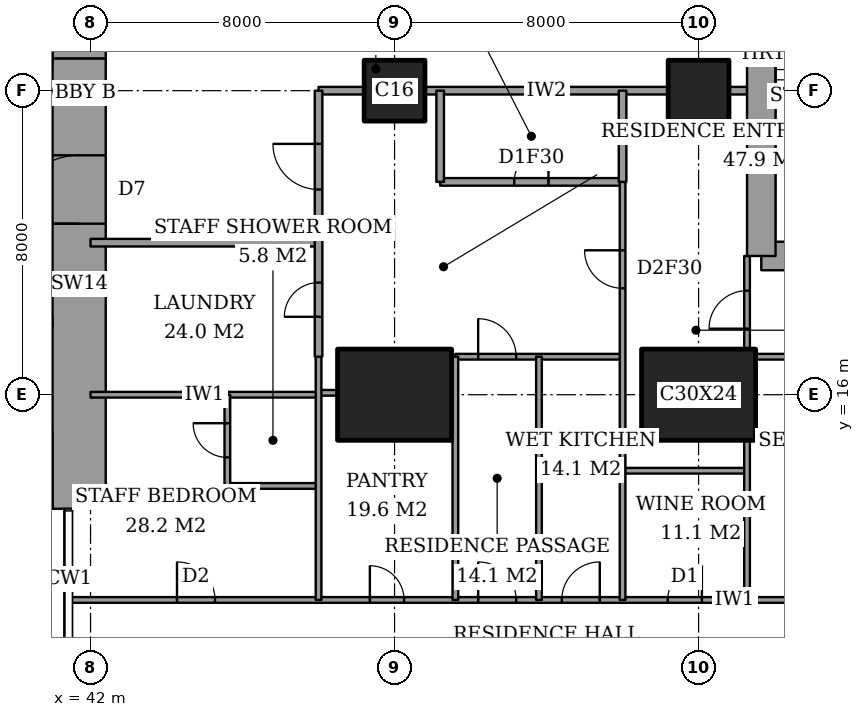
"""IFC4 building model, lengths in metres.
Left out: names, types, materials, properties, quantities, classifications, styles, units other than length and angle.
Written with IfcOpenShell. Run it as: python <this file> out.ifc"""

import sys

from ifc_helpers import new_model, si_unit, direction, frame, frame_2d, origin, origin_2d, place, context, subcontext, project, spatial, rectangle, extrude, element, fill, save


model = new_model("IFC4")
c1 = context("Model", 3, precision=1e-05, world=origin(), true_north=direction((0.0, 1.0)))
c2 = subcontext(c1, "Body", "Model", "MODEL_VIEW")
j1 = project(units=[si_unit("LENGTHUNIT", "METRE"), si_unit("PLANEANGLEUNIT", "RADIAN")], contexts=[c1])
p1 = place(None, origin())
s1 = spatial("IfcSite", under=j1, at=p1, CompositionType="ELEMENT")
p2 = place(p1, origin())
s2 = spatial("IfcBuilding", under=s1, at=p2, CompositionType="ELEMENT")
p3 = place(p2, frame((0.0, 0.0, 270.0)))
s3 = spatial("IfcBuildingStorey", under=s2, at=p3, CompositionType="ELEMENT", Elevation=270.0)
p4 = place(p3, frame((50.0, 16.0, 0.0), z_axis=(0.0, 0.0, 1.0), x_axis=(1.0, 0.0, 0.0)))
e1 = element("IfcColumn", 1, at=p4, inside=s3, PredefinedType="COLUMN", context=c2, shape_type="SweptSolid", body=[
    extrude(rectangle(XDim=3.0, YDim=2.4, at=origin_2d()), origin(), (0.0, 0.0, 1.0), 3.6),
])
p5 = place(p3, frame((50.0, 24.0, 0.0), z_axis=(0.0, 0.0, 1.0), x_axis=(1.0, 0.0, 0.0)))
e2 = element("IfcColumn", 2, at=p5, inside=s3, PredefinedType="COLUMN", context=c2, shape_type="SweptSolid", body=[
    extrude(rectangle(XDim=1.6, YDim=1.6, at=origin_2d()), origin(), (0.0, 0.0, 1.0), 3.6),
])
p6 = place(p3, frame((58.0, 16.0, 0.0), z_axis=(0.0, 0.0, 1.0), x_axis=(1.0, 0.0, 0.0)))
e3 = element("IfcColumn", 3, at=p6, inside=s3, PredefinedType="COLUMN", context=c2, shape_type="SweptSolid", body=[
    extrude(rectangle(XDim=3.0, YDim=2.4, at=origin_2d()), origin(), (0.0, 0.0, 1.0), 3.6),
])
p7 = place(p3, frame((58.0, 24.0, 0.0), z_axis=(0.0, 0.0, 1.0), x_axis=(1.0, 0.0, 0.0)))
e4 = element("IfcColumn", 4, at=p7, inside=s3, PredefinedType="COLUMN", context=c2, shape_type="SweptSolid", body=[
    extrude(rectangle(XDim=1.6, YDim=1.6, at=origin_2d()), origin(), (0.0, 0.0, 1.0), 3.6),
])
p8 = place(p3, frame((41.7, 13.0, 0.0), z_axis=(0.0, 0.0, 1.0), x_axis=(0.0, 1.0, 0.0)))
e5 = element("IfcWall", 5, at=p8, inside=s3, PredefinedType="SHEAR", context=c2, shape_type="SweptSolid", body=[
    extrude(rectangle(XDim=11.85, YDim=1.4, at=frame_2d((5.925, 0.0))), origin(), (0.0, 0.0, 1.0), 3.6),
])
p9 = place(p8, frame((7.5, 0.0, 0.0)))
e6 = element("IfcOpeningElement", 6, at=p9, cuts=e5, PredefinedType="OPENING", context=c2, shape_type="SweptSolid", body=[
    extrude(rectangle(XDim=1.8, YDim=2.4, at=frame_2d((0.9, 1.2))), frame((0.0, 0.71, 0.0), z_axis=(0.0, -1.0, 0.0), x_axis=(1.0, 0.0, 0.0)), (0.0, 0.0, 1.0), 1.42),
])
p10 = place(p3, frame((41.7, 24.85, 0.0), z_axis=(0.0, 0.0, 1.0), x_axis=(0.0, 1.0, 0.0)))
e7 = element("IfcWall", 7, at=p10, inside=s3, PredefinedType="SHEAR", context=c2, shape_type="SweptSolid", body=[
    extrude(rectangle(XDim=10.15, YDim=1.4, at=frame_2d((5.075, 0.0))), origin(), (0.0, 0.0, 1.0), 3.6),
])
p11 = place(p3, frame((59.65, 19.65, 0.0), z_axis=(0.0, 0.0, 1.0), x_axis=(1.0, 0.0, 0.0)))
e8 = element("IfcWall", 8, at=p11, inside=s3, PredefinedType="SHEAR", context=c2, shape_type="SweptSolid", body=[
    extrude(rectangle(XDim=4.45, YDim=0.75, at=frame_2d((2.225, 0.0))), origin(), (0.0, 0.0, 1.0), 3.6),
])
p12 = place(p3, frame((59.65, 28.35, 0.0), z_axis=(0.0, 0.0, 1.0), x_axis=(0.0, -1.0, 0.0)))
e9 = element("IfcWall", 9, at=p12, inside=s3, PredefinedType="SHEAR", context=c2, shape_type="SweptSolid", body=[
    extrude(rectangle(XDim=8.7, YDim=0.75, at=frame_2d((4.35, 0.0))), origin(), (0.0, 0.0, 1.0), 3.6),
])
p13 = place(p12, frame((0.975, 0.0, 0.0)))
e10 = element("IfcOpeningElement", 10, at=p13, cuts=e9, PredefinedType="OPENING", context=c2, shape_type="SweptSolid", body=[
    extrude(rectangle(XDim=1.0, YDim=2.1, at=frame_2d((0.5, 1.05))), frame((0.0, 0.385, 0.0), z_axis=(0.0, -1.0, 0.0), x_axis=(1.0, 0.0, 0.0)), (0.0, 0.0, 1.0), 0.77),
])
p14 = place(p3, frame((41.439, 10.6, 0.0), z_axis=(0.0, 0.0, 1.0), x_axis=(1.0, 0.0, 0.0)))
e11 = element("IfcWall", 11, at=p14, inside=s3, PredefinedType="PARTITIONING", context=c2, shape_type="SweptSolid", body=[
    extrude(rectangle(XDim=25.011, YDim=0.15, at=frame_2d((12.505, 0.0))), origin(), (0.0, 0.0, 1.0), 3.35),
])
p15 = place(p14, frame((10.761, 0.0, 0.0)))
e12 = element("IfcOpeningElement", 12, at=p15, cuts=e11, PredefinedType="OPENING", context=c2, shape_type="SweptSolid", body=[
    extrude(rectangle(XDim=1.0, YDim=2.1, at=frame_2d((0.5, 1.05))), frame((0.0, 0.085, 0.0), z_axis=(0.0, -1.0, 0.0), x_axis=(1.0, 0.0, 0.0)), (0.0, 0.0, 1.0), 0.17),
])
p16 = place(p14, frame((20.924, 0.0, 0.0)))
e13 = element("IfcOpeningElement", 13, at=p16, cuts=e11, PredefinedType="OPENING", context=c2, shape_type="SweptSolid", body=[
    extrude(rectangle(XDim=1.0, YDim=2.1, at=frame_2d((0.5, 1.05))), frame((0.0, 0.085, 0.0), z_axis=(0.0, -1.0, 0.0), x_axis=(1.0, 0.0, 0.0)), (0.0, 0.0, 1.0), 0.17),
])
p17 = place(p14, frame((15.749, 0.0, 0.0)))
e14 = element("IfcOpeningElement", 14, at=p17, cuts=e11, PredefinedType="OPENING", context=c2, shape_type="SweptSolid", body=[
    extrude(rectangle(XDim=0.9, YDim=2.1, at=frame_2d((0.45, 1.05))), frame((0.0, 0.085, 0.0), z_axis=(0.0, -1.0, 0.0), x_axis=(1.0, 0.0, 0.0)), (0.0, 0.0, 1.0), 0.17),
])
p18 = place(p14, frame((12.961, 0.0, 0.0)))
e15 = element("IfcOpeningElement", 15, at=p18, cuts=e11, PredefinedType="OPENING", context=c2, shape_type="SweptSolid", body=[
    extrude(rectangle(XDim=1.0, YDim=2.1, at=frame_2d((0.5, 1.05))), frame((0.0, 0.085, 0.0), z_axis=(0.0, -1.0, 0.0), x_axis=(1.0, 0.0, 0.0)), (0.0, 0.0, 1.0), 0.17),
])
p19 = place(p14, frame((7.911, 0.0, 0.0)))
e16 = element("IfcOpeningElement", 16, at=p19, cuts=e11, PredefinedType="OPENING", context=c2, shape_type="SweptSolid", body=[
    extrude(rectangle(XDim=0.9, YDim=2.1, at=frame_2d((0.45, 1.05))), frame((0.0, 0.085, 0.0), z_axis=(0.0, -1.0, 0.0), x_axis=(1.0, 0.0, 0.0)), (0.0, 0.0, 1.0), 0.17),
])
p20 = place(p14, frame((2.836, 0.0, 0.0)))
e17 = element("IfcOpeningElement", 17, at=p20, cuts=e11, PredefinedType="OPENING", context=c2, shape_type="SweptSolid", body=[
    extrude(rectangle(XDim=1.0, YDim=2.1, at=frame_2d((0.5, 1.05))), frame((0.0, 0.085, 0.0), z_axis=(0.0, -1.0, 0.0), x_axis=(1.0, 0.0, 0.0)), (0.0, 0.0, 1.0), 0.17),
])
p21 = place(p3, frame((45.6, 13.6, 0.0), z_axis=(0.0, 0.0, 1.0), x_axis=(1.0, 0.0, 0.0)))
e18 = element("IfcWall", 18, at=p21, inside=s3, PredefinedType="PARTITIONING", context=c2, shape_type="SweptSolid", body=[
    extrude(rectangle(XDim=2.4, YDim=0.15, at=frame_2d((1.2, 0.0))), origin(), (0.0, 0.0, 1.0), 3.35),
])
p22 = place(p3, frame((56.0, 14.0, 0.0), z_axis=(0.0, 0.0, 1.0), x_axis=(1.0, 0.0, 0.0)))
e19 = element("IfcWall", 19, at=p22, inside=s3, PredefinedType="PARTITIONING", context=c2, shape_type="SweptSolid", body=[
    extrude(rectangle(XDim=3.275, YDim=0.15, at=frame_2d((1.637, 0.0))), origin(), (0.0, 0.0, 1.0), 3.35),
])
p23 = place(p3, frame((42.0, 16.0, 0.0), z_axis=(0.0, 0.0, 1.0), x_axis=(1.0, 0.0, 0.0)))
e20 = element("IfcWall", 20, at=p23, inside=s3, PredefinedType="PARTITIONING", context=c2, shape_type="SweptSolid", body=[
    extrude(rectangle(XDim=6.0, YDim=0.15, at=frame_2d((3.0, 0.0))), origin(), (0.0, 0.0, 1.0), 2.634),
])
p24 = place(p3, frame((48.0, 16.05, 0.0), z_axis=(0.0, 0.0, 1.0), x_axis=(1.0, 0.0, 0.0)))
e21 = element("IfcWall", 21, at=p24, inside=s3, PredefinedType="PARTITIONING", context=c2, shape_type="SweptSolid", body=[
    extrude(rectangle(XDim=0.5, YDim=0.15, at=frame_2d((0.25, 0.0))), origin(), (0.0, 0.0, 1.0), 2.634),
])
p25 = place(p3, frame((51.6, 17.0, 0.0), z_axis=(0.0, 0.0, 1.0), x_axis=(1.0, 0.0, 0.0)))
e22 = element("IfcWall", 22, at=p25, inside=s3, PredefinedType="PARTITIONING", context=c2, shape_type="SweptSolid", body=[
    extrude(rectangle(XDim=4.4, YDim=0.15, at=frame_2d((2.2, 0.0))), origin(), (0.0, 0.0, 1.0), 3.35),
])
p26 = place(p25, frame((0.6, 0.0, 0.0)))
e23 = element("IfcOpeningElement", 23, at=p26, cuts=e22, PredefinedType="OPENING", context=c2, shape_type="SweptSolid", body=[
    extrude(rectangle(XDim=1.0, YDim=2.1, at=frame_2d((0.5, 1.05))), frame((0.0, 0.085, 0.0), z_axis=(0.0, -1.0, 0.0), x_axis=(1.0, 0.0, 0.0)), (0.0, 0.0, 1.0), 0.17),
])
p27 = place(p3, frame((59.5, 17.0, 0.0), z_axis=(0.0, 0.0, 1.0), x_axis=(1.0, 0.0, 0.0)))
e24 = element("IfcWall", 24, at=p27, inside=s3, PredefinedType="PARTITIONING", context=c2, shape_type="SweptSolid", body=[
    extrude(rectangle(XDim=6.95, YDim=0.15, at=frame_2d((3.475, 0.0))), origin(), (0.0, 0.0, 1.0), 3.35),
])
p28 = place(p3, frame((42.0, 20.0, 0.0), z_axis=(0.0, 0.0, 1.0), x_axis=(1.0, 0.0, 0.0)))
e25 = element("IfcWall", 25, at=p28, inside=s3, PredefinedType="PARTITIONING", context=c2, shape_type="SweptSolid", body=[
    extrude(rectangle(XDim=6.0, YDim=0.2, at=frame_2d((3.0, 0.0))), origin(), (0.0, 0.0, 1.0), 3.35),
])
p29 = place(p3, frame((51.2, 21.6, 0.0), z_axis=(0.0, 0.0, 1.0), x_axis=(1.0, 0.0, 0.0)))
e26 = element("IfcWall", 26, at=p29, inside=s3, PredefinedType="PARTITIONING", context=c2, shape_type="SweptSolid", body=[
    extrude(rectangle(XDim=4.8, YDim=0.2, at=frame_2d((2.4, 0.0))), origin(), (0.0, 0.0, 1.0), 3.35),
])
p30 = place(p29, frame((1.95, 0.0, 0.0)))
e27 = element("IfcOpeningElement", 27, at=p30, cuts=e26, PredefinedType="OPENING", context=c2, shape_type="SweptSolid", body=[
    extrude(rectangle(XDim=0.9, YDim=2.1, at=frame_2d((0.45, 1.05))), frame((0.0, 0.11, 0.0), z_axis=(0.0, -1.0, 0.0), x_axis=(1.0, 0.0, 0.0)), (0.0, 0.0, 1.0), 0.22),
])
p31 = place(p3, frame((48.0, 24.0, 0.0), z_axis=(0.0, 0.0, 1.0), x_axis=(1.0, 0.0, 0.0)))
e28 = element("IfcWall", 28, at=p31, inside=s3, PredefinedType="PARTITIONING", context=c2, shape_type="SweptSolid", body=[
    extrude(rectangle(XDim=1.2, YDim=0.2, at=frame_2d((0.6, 0.0))), origin(), (0.0, 0.0, 1.0), 3.35),
])
p32 = place(p3, frame((50.8, 24.0, 0.0), z_axis=(0.0, 0.0, 1.0), x_axis=(1.0, 0.0, 0.0)))
e29 = element("IfcWall", 29, at=p32, inside=s3, PredefinedType="PARTITIONING", context=c2, shape_type="SweptSolid", body=[
    extrude(rectangle(XDim=6.4, YDim=0.2, at=frame_2d((3.2, 0.0))), origin(), (0.0, 0.0, 1.0), 3.35),
])
p33 = place(p3, frame((58.8, 24.0, 0.0), z_axis=(0.0, 0.0, 1.0), x_axis=(1.0, 0.0, 0.0)))
e30 = element("IfcWall", 30, at=p33, inside=s3, PredefinedType="PARTITIONING", context=c2, shape_type="SweptSolid", body=[
    extrude(rectangle(XDim=0.475, YDim=0.2, at=frame_2d((0.237, 0.0))), origin(), (0.0, 0.0, 1.0), 3.35),
])
p34 = place(p3, frame((45.6, 13.6, 0.0), z_axis=(0.0, 0.0, 1.0), x_axis=(0.0, 1.0, 0.0)))
e31 = element("IfcWall", 31, at=p34, inside=s3, PredefinedType="PARTITIONING", context=c2, shape_type="SweptSolid", body=[
    extrude(rectangle(XDim=2.4, YDim=0.15, at=frame_2d((1.2, 0.0))), origin(), (0.0, 0.0, 1.0), 3.35),
])
p35 = place(p34, frame((0.75, 0.0, 0.0)))
e32 = element("IfcOpeningElement", 32, at=p35, cuts=e31, PredefinedType="OPENING", context=c2, shape_type="SweptSolid", body=[
    extrude(rectangle(XDim=0.9, YDim=2.1, at=frame_2d((0.45, 1.05))), frame((0.0, 0.085, 0.0), z_axis=(0.0, -1.0, 0.0), x_axis=(1.0, 0.0, 0.0)), (0.0, 0.0, 1.0), 0.17),
])
p36 = place(p3, frame((48.0, 17.0, 0.0), z_axis=(0.0, 0.0, 1.0), x_axis=(0.0, 1.0, 0.0)))
e33 = element("IfcWall", 33, at=p36, inside=s3, PredefinedType="PARTITIONING", context=c2, shape_type="SweptSolid", body=[
    extrude(rectangle(XDim=7.0, YDim=0.2, at=frame_2d((3.5, 0.0))), origin(), (0.0, 0.0, 1.0), 3.35),
])
p37 = place(p36, frame((4.4, 0.0, 0.0)))
e34 = element("IfcOpeningElement", 34, at=p37, cuts=e33, PredefinedType="OPENING", context=c2, shape_type="SweptSolid", body=[
    extrude(rectangle(XDim=1.2, YDim=2.4, at=frame_2d((0.6, 1.2))), frame((0.0, 0.11, 0.0), z_axis=(0.0, -1.0, 0.0), x_axis=(1.0, 0.0, 0.0)), (0.0, 0.0, 1.0), 0.22),
])
p38 = place(p36, frame((1.05, 0.0, 0.0)))
e35 = element("IfcOpeningElement", 35, at=p38, cuts=e33, PredefinedType="OPENING", context=c2, shape_type="SweptSolid", body=[
    extrude(rectangle(XDim=0.9, YDim=2.1, at=frame_2d((0.45, 1.05))), frame((0.0, 0.11, 0.0), z_axis=(0.0, -1.0, 0.0), x_axis=(1.0, 0.0, 0.0)), (0.0, 0.0, 1.0), 0.22),
])
p39 = place(p3, frame((48.0, 10.6, 0.0), z_axis=(0.0, 0.0, 1.0), x_axis=(0.0, 1.0, 0.0)))
e36 = element("IfcWall", 36, at=p39, inside=s3, PredefinedType="PARTITIONING", context=c2, shape_type="SweptSolid", body=[
    extrude(rectangle(XDim=6.4, YDim=0.15, at=frame_2d((3.2, 0.0))), origin(), (0.0, 0.0, 1.0), 3.35),
])
p40 = place(p3, frame((51.2, 21.6, 0.0), z_axis=(0.0, 0.0, 1.0), x_axis=(0.0, 1.0, 0.0)))
e37 = element("IfcWall", 37, at=p40, inside=s3, PredefinedType="PARTITIONING", context=c2, shape_type="SweptSolid", body=[
    extrude(rectangle(XDim=2.4, YDim=0.2, at=frame_2d((1.2, 0.0))), origin(), (0.0, 0.0, 1.0), 3.35),
])
for number, where, z_axis, x_axis in (
    (38, (51.6, 10.6, 0.0), (0.0, 0.0, 1.0), (0.0, 1.0, 0.0)),
    (39, (53.8, 10.6, 0.0), (0.0, 0.0, 1.0), (0.0, 1.0, 0.0)),
):
    element("IfcWall", number, at=place(p3, frame(where, z_axis=z_axis, x_axis=x_axis)), inside=s3, PredefinedType="PARTITIONING", context=c2, shape_type="SweptSolid", body=[
        extrude(rectangle(XDim=6.4, YDim=0.15, at=frame_2d((3.2, 0.0))), origin(), (0.0, 0.0, 1.0), 3.35),
    ])
p41 = place(p3, frame((56.0, 21.6, 0.0), z_axis=(0.0, 0.0, 1.0), x_axis=(0.0, 1.0, 0.0)))
e40 = element("IfcWall", 40, at=p41, inside=s3, PredefinedType="PARTITIONING", context=c2, shape_type="SweptSolid", body=[
    extrude(rectangle(XDim=2.4, YDim=0.2, at=frame_2d((1.2, 0.0))), origin(), (0.0, 0.0, 1.0), 3.35),
])
p42 = place(p3, frame((56.0, 10.6, 0.0), z_axis=(0.0, 0.0, 1.0), x_axis=(0.0, 1.0, 0.0)))
e41 = element("IfcWall", 41, at=p42, inside=s3, PredefinedType="PARTITIONING", context=c2, shape_type="SweptSolid", body=[
    extrude(rectangle(XDim=11.0, YDim=0.15, at=frame_2d((5.5, 0.0))), origin(), (0.0, 0.0, 1.0), 3.35),
])
p43 = place(p42, frame((8.2, 0.0, 0.0)))
e42 = element("IfcOpeningElement", 42, at=p43, cuts=e41, PredefinedType="OPENING", context=c2, shape_type="SweptSolid", body=[
    extrude(rectangle(XDim=1.0, YDim=2.1, at=frame_2d((0.5, 1.05))), frame((0.0, 0.085, 0.0), z_axis=(0.0, -1.0, 0.0), x_axis=(1.0, 0.0, 0.0)), (0.0, 0.0, 1.0), 0.17),
])
p44 = place(p3, frame((59.275, 10.6, 0.0), z_axis=(0.0, 0.0, 1.0), x_axis=(0.0, 1.0, 0.0)))
e43 = element("IfcWall", 43, at=p44, inside=s3, PredefinedType="PARTITIONING", context=c2, shape_type="SweptSolid", body=[
    extrude(rectangle(XDim=4.2, YDim=0.15, at=frame_2d((2.1, 0.0))), origin(), (0.0, 0.0, 1.0), 3.35),
])
p45 = place(p3, frame((59.275, 17.2, 0.0), z_axis=(0.0, 0.0, 1.0), x_axis=(0.0, 1.0, 0.0)))
e44 = element("IfcWall", 44, at=p45, inside=s3, PredefinedType="PARTITIONING", context=c2, shape_type="SweptSolid", body=[
    extrude(rectangle(XDim=2.45, YDim=0.15, at=frame_2d((1.225, 0.0))), origin(), (0.0, 0.0, 1.0), 3.35),
])
p46 = place(p45, frame((0.538, 0.0, 0.0)))
e45 = element("IfcOpeningElement", 45, at=p46, cuts=e44, PredefinedType="OPENING", context=c2, shape_type="SweptSolid", body=[
    extrude(rectangle(XDim=1.0, YDim=2.1, at=frame_2d((0.5, 1.05))), frame((0.0, 0.085, 0.0), z_axis=(0.0, -1.0, 0.0), x_axis=(1.0, 0.0, 0.0)), (0.0, 0.0, 1.0), 0.17),
])
p47 = place(p3, frame((28.3, 17.9, 0.0), z_axis=(0.0, 0.0, 1.0), x_axis=(1.0, 0.0, 0.0)))
e46 = element("IfcWall", 46, at=p47, inside=s3, PredefinedType="PARTITIONING", context=c2, shape_type="SweptSolid", body=[
    extrude(rectangle(XDim=12.7, YDim=0.2, at=frame_2d((6.35, 0.0))), origin(), (0.0, 0.0, 1.0), 3.6),
])
p48 = place(p47, frame((1.05, 0.0, 0.0)))
e47 = element("IfcOpeningElement", 47, at=p48, cuts=e46, PredefinedType="OPENING", context=c2, shape_type="SweptSolid", body=[
    extrude(rectangle(XDim=0.9, YDim=2.1, at=frame_2d((0.45, 1.05))), frame((0.0, 0.11, 0.0), z_axis=(0.0, -1.0, 0.0), x_axis=(1.0, 0.0, 0.0)), (0.0, 0.0, 1.0), 0.22),
])
p49 = place(p47, frame((7.45, 0.0, 0.0)))
e48 = element("IfcOpeningElement", 48, at=p49, cuts=e46, PredefinedType="OPENING", context=c2, shape_type="SweptSolid", body=[
    extrude(rectangle(XDim=0.9, YDim=2.1, at=frame_2d((0.45, 1.05))), frame((0.0, 0.11, 0.0), z_axis=(0.0, -1.0, 0.0), x_axis=(1.0, 0.0, 0.0)), (0.0, 0.0, 1.0), 0.22),
])
p50 = place(p47, frame((10.6, 0.0, 0.0)))
e49 = element("IfcOpeningElement", 49, at=p50, cuts=e46, PredefinedType="OPENING", context=c2, shape_type="SweptSolid", body=[
    extrude(rectangle(XDim=1.2, YDim=2.1, at=frame_2d((0.6, 1.05))), frame((0.0, 0.11, 0.0), z_axis=(0.0, -1.0, 0.0), x_axis=(1.0, 0.0, 0.0)), (0.0, 0.0, 1.0), 0.22),
])
p51 = place(p15, origin())
e50 = element("IfcDoor", 50, at=p51, inside=s3, OperationType="SINGLE_SWING_RIGHT", PredefinedType="DOOR", context=c2, shape_type="SweptSolid", body=[
    extrude(rectangle(XDim=1.0, YDim=2.1, at=frame_2d((0.5, 1.05))), frame((0.0, 0.025, 0.0), z_axis=(0.0, -1.0, 0.0), x_axis=(1.0, 0.0, 0.0)), (0.0, 0.0, 1.0), 0.05),
])
fill(e12, e50)
p52 = place(p46, origin())
e51 = element("IfcDoor", 51, at=p52, inside=s3, OperationType="SINGLE_SWING_RIGHT", PredefinedType="DOOR", context=c2, shape_type="SweptSolid", body=[
    extrude(rectangle(XDim=1.0, YDim=2.1, at=frame_2d((0.5, 1.05))), frame((0.0, 0.025, 0.0), z_axis=(0.0, -1.0, 0.0), x_axis=(1.0, 0.0, 0.0)), (0.0, 0.0, 1.0), 0.05),
])
fill(e45, e51)
p53 = place(p17, origin())
e52 = element("IfcDoor", 52, at=p53, inside=s3, OperationType="SINGLE_SWING_LEFT", PredefinedType="DOOR", context=c2, shape_type="SweptSolid", body=[
    extrude(rectangle(XDim=0.9, YDim=2.1, at=frame_2d((0.45, 1.05))), frame((0.0, 0.025, 0.0), z_axis=(0.0, -1.0, 0.0), x_axis=(1.0, 0.0, 0.0)), (0.0, 0.0, 1.0), 0.05),
])
fill(e14, e52)
p54 = place(p43, origin())
e53 = element("IfcDoor", 53, at=p54, inside=s3, OperationType="SINGLE_SWING_LEFT", PredefinedType="DOOR", context=c2, shape_type="SweptSolid", body=[
    extrude(rectangle(XDim=1.0, YDim=2.1, at=frame_2d((0.5, 1.05))), frame((0.0, 0.025, 0.0), z_axis=(0.0, -1.0, 0.0), x_axis=(1.0, 0.0, 0.0)), (0.0, 0.0, 1.0), 0.05),
])
fill(e42, e53)
p55 = place(p30, origin())
e54 = element("IfcDoor", 54, at=p55, inside=s3, OperationType="SINGLE_SWING_LEFT", PredefinedType="DOOR", context=c2, shape_type="SweptSolid", body=[
    extrude(rectangle(XDim=0.9, YDim=2.1, at=frame_2d((0.45, 1.05))), frame((0.0, 0.025, 0.0), z_axis=(0.0, -1.0, 0.0), x_axis=(1.0, 0.0, 0.0)), (0.0, 0.0, 1.0), 0.05),
])
fill(e27, e54)
p56 = place(p37, origin())
e55 = element("IfcDoor", 55, at=p56, inside=s3, OperationType="SINGLE_SWING_LEFT", PredefinedType="DOOR", context=c2, shape_type="SweptSolid", body=[
    extrude(rectangle(XDim=1.2, YDim=2.4, at=frame_2d((0.6, 1.2))), frame((0.0, 0.025, 0.0), z_axis=(0.0, -1.0, 0.0), x_axis=(1.0, 0.0, 0.0)), (0.0, 0.0, 1.0), 0.05),
])
fill(e34, e55)
p57 = place(p18, origin())
e56 = element("IfcDoor", 56, at=p57, inside=s3, OperationType="SINGLE_SWING_LEFT", PredefinedType="DOOR", context=c2, shape_type="SweptSolid", body=[
    extrude(rectangle(XDim=1.0, YDim=2.1, at=frame_2d((0.5, 1.05))), frame((0.0, 0.025, 0.0), z_axis=(0.0, -1.0, 0.0), x_axis=(1.0, 0.0, 0.0)), (0.0, 0.0, 1.0), 0.05),
])
fill(e15, e56)
p58 = place(p26, origin())
e57 = element("IfcDoor", 57, at=p58, inside=s3, OperationType="SINGLE_SWING_RIGHT", PredefinedType="DOOR", context=c2, shape_type="SweptSolid", body=[
    extrude(rectangle(XDim=1.0, YDim=2.1, at=frame_2d((0.5, 1.05))), frame((0.0, 0.025, 0.0), z_axis=(0.0, -1.0, 0.0), x_axis=(1.0, 0.0, 0.0)), (0.0, 0.0, 1.0), 0.05),
])
fill(e23, e57)
p59 = place(p19, origin())
e58 = element("IfcDoor", 58, at=p59, inside=s3, OperationType="SINGLE_SWING_RIGHT", PredefinedType="DOOR", context=c2, shape_type="SweptSolid", body=[
    extrude(rectangle(XDim=0.9, YDim=2.1, at=frame_2d((0.45, 1.05))), frame((0.0, 0.025, 0.0), z_axis=(0.0, -1.0, 0.0), x_axis=(1.0, 0.0, 0.0)), (0.0, 0.0, 1.0), 0.05),
])
fill(e16, e58)
p60 = place(p35, origin())
e59 = element("IfcDoor", 59, at=p60, inside=s3, OperationType="SINGLE_SWING_LEFT", PredefinedType="DOOR", context=c2, shape_type="SweptSolid", body=[
    extrude(rectangle(XDim=0.9, YDim=2.1, at=frame_2d((0.45, 1.05))), frame((0.0, 0.025, 0.0), z_axis=(0.0, -1.0, 0.0), x_axis=(1.0, 0.0, 0.0)), (0.0, 0.0, 1.0), 0.05),
])
fill(e32, e59)
p61 = place(p20, origin())
e60 = element("IfcDoor", 60, at=p61, inside=s3, OperationType="SINGLE_SWING_RIGHT", PredefinedType="DOOR", context=c2, shape_type="SweptSolid", body=[
    extrude(rectangle(XDim=1.0, YDim=2.1, at=frame_2d((0.5, 1.05))), frame((0.0, 0.025, 0.0), z_axis=(0.0, -1.0, 0.0), x_axis=(1.0, 0.0, 0.0)), (0.0, 0.0, 1.0), 0.05),
])
fill(e17, e60)
p62 = place(p38, origin())
e61 = element("IfcDoor", 61, at=p62, inside=s3, OperationType="SINGLE_SWING_RIGHT", PredefinedType="DOOR", context=c2, shape_type="SweptSolid", body=[
    extrude(rectangle(XDim=0.9, YDim=2.1, at=frame_2d((0.45, 1.05))), frame((0.0, 0.025, 0.0), z_axis=(0.0, -1.0, 0.0), x_axis=(1.0, 0.0, 0.0)), (0.0, 0.0, 1.0), 0.05),
])
fill(e35, e61)
p63 = place(p9, origin())
e62 = element("IfcDoor", 62, at=p63, inside=s3, OperationType="DOUBLE_DOOR_DOUBLE_SWING", PredefinedType="DOOR", context=c2, shape_type="SweptSolid", body=[
    extrude(rectangle(XDim=1.8, YDim=2.4, at=frame_2d((0.9, 1.2))), frame((0.0, 0.025, 0.0), z_axis=(0.0, -1.0, 0.0), x_axis=(1.0, 0.0, 0.0)), (0.0, 0.0, 1.0), 0.05),
])
fill(e6, e62)
save(model, sys.argv[1])
